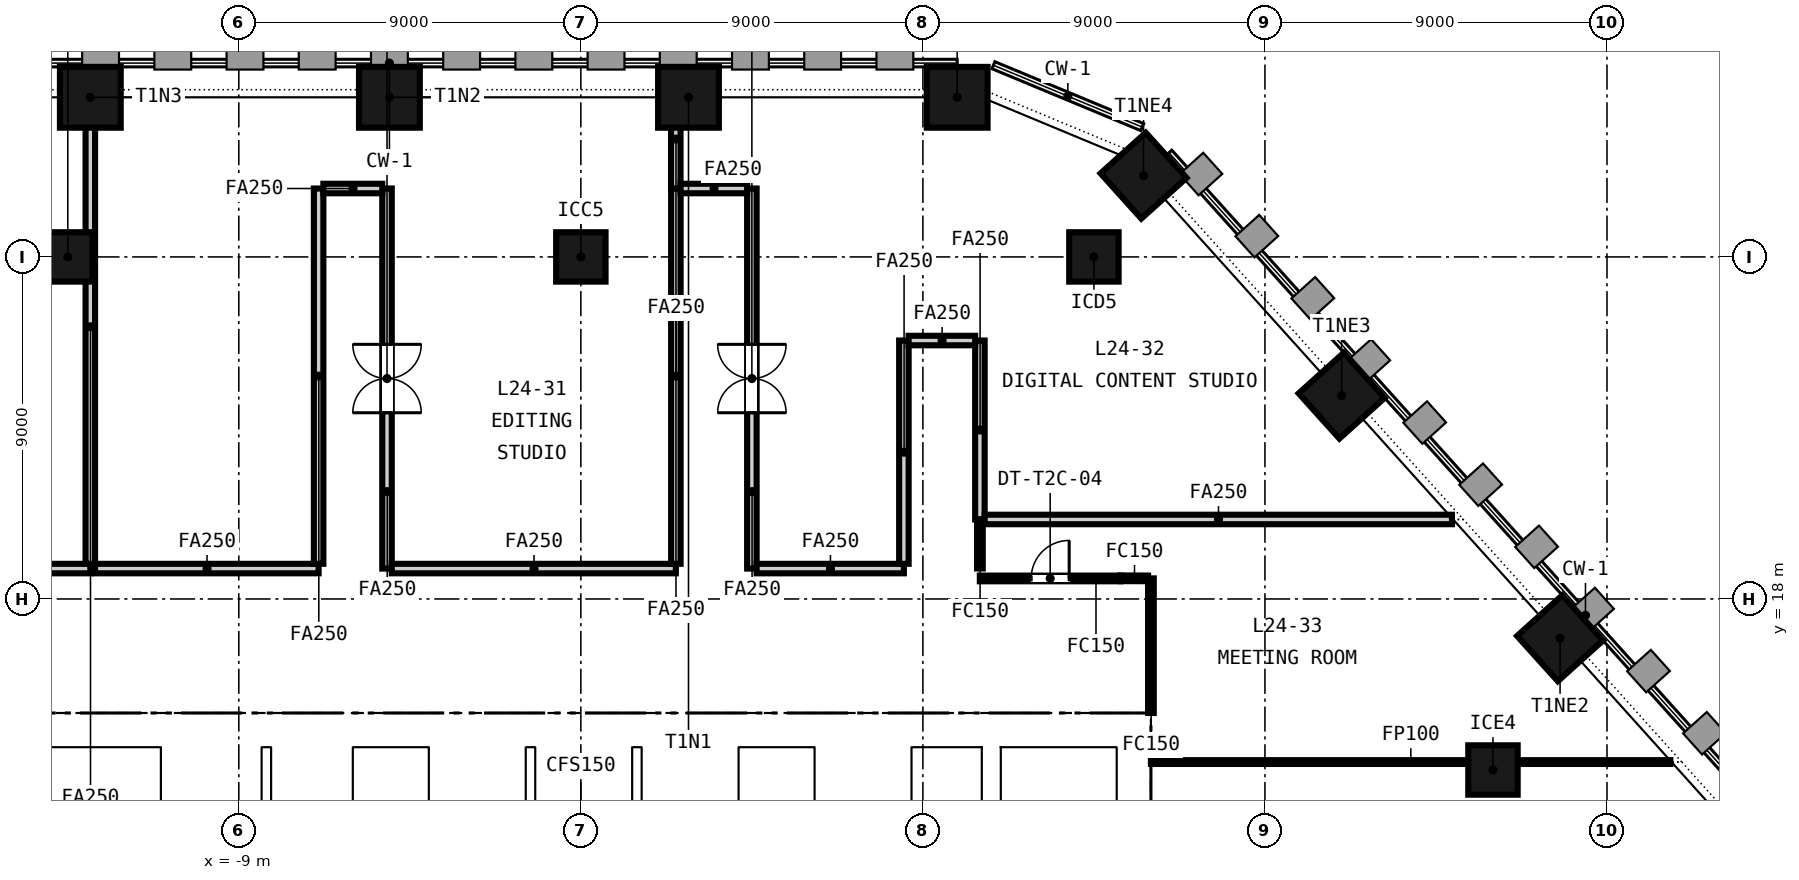
"""IFC4 building model, lengths in metres.
Left out: names, types, materials, properties, quantities, classifications, styles, units other than length and angle.
Written with IfcOpenShell. Run it as: python <this file> out.ifc"""

import sys

from ifc_helpers import new_model, si_unit, direction, frame, frame_2d, origin, origin_2d, place, context, subcontext, project, spatial, rectangle, extrude, element, fill, save


model = new_model("IFC4")
c1 = context("Model", 3, precision=1e-05, world=origin(), true_north=direction((0.0, 1.0)))
c2 = subcontext(c1, "Body", "Model", "MODEL_VIEW")
j1 = project(units=[si_unit("LENGTHUNIT", "METRE"), si_unit("PLANEANGLEUNIT", "RADIAN")], contexts=[c1])
p1 = place(None, origin())
s1 = spatial("IfcSite", under=j1, at=p1, CompositionType="ELEMENT")
p2 = place(p1, origin())
s2 = spatial("IfcBuilding", under=s1, at=p2, CompositionType="ELEMENT")
p3 = place(p2, frame((0.0, 0.0, 102.55)))
s3 = spatial("IfcBuildingStorey", under=s2, at=p3, CompositionType="ELEMENT", Elevation=102.55)
p4 = place(p3, frame((-15.0, 14.55, -0.15), z_axis=(0.0, 0.0, 1.0), x_axis=(1.0, 0.0, 0.0)))
e1 = element("IfcWall", 1, at=p4, inside=s3, PredefinedType="SOLIDWALL", context=c2, shape_type="SweptSolid", body=[
    extrude(rectangle(XDim=30.0, YDim=0.9, at=frame_2d((15.0, 0.0))), origin(), (0.0, 0.0, 1.0), 3.65),
])
p5 = place(p4, frame((9.25, 0.0, 0.15)))
e2 = element("IfcOpeningElement", 2, at=p5, cuts=e1, PredefinedType="OPENING", context=c2, shape_type="SweptSolid", body=[
    extrude(rectangle(XDim=1.5, YDim=2.1, at=frame_2d((0.75, 1.05))), frame((0.0, 0.46, 0.0), z_axis=(0.0, -1.0, 0.0), x_axis=(1.0, 0.0, 0.0)), (0.0, 0.0, 1.0), 0.92),
])
p6 = place(p4, frame((19.4, 0.0, 0.15)))
e3 = element("IfcOpeningElement", 3, at=p6, cuts=e1, PredefinedType="OPENING", context=c2, shape_type="SweptSolid", body=[
    extrude(rectangle(XDim=1.5, YDim=2.1, at=frame_2d((0.75, 1.05))), frame((0.0, 0.46, 0.0), z_axis=(0.0, -1.0, 0.0), x_axis=(1.0, 0.0, 0.0)), (0.0, 0.0, 1.0), 0.92),
])
p7 = place(p4, frame((1.5, 0.0, 0.15)))
e4 = element("IfcOpeningElement", 4, at=p7, cuts=e1, PredefinedType="OPENING", context=c2, shape_type="SweptSolid", body=[
    extrude(rectangle(XDim=1.2, YDim=2.1, at=frame_2d((0.6, 1.05))), frame((0.0, 0.46, 0.0), z_axis=(0.0, -1.0, 0.0), x_axis=(1.0, 0.0, 0.0)), (0.0, 0.0, 1.0), 0.92),
])
p8 = place(p4, frame((27.3, 0.0, 0.15)))
e5 = element("IfcOpeningElement", 5, at=p8, cuts=e1, PredefinedType="OPENING", context=c2, shape_type="SweptSolid", body=[
    extrude(rectangle(XDim=1.2, YDim=2.1, at=frame_2d((0.6, 1.05))), frame((0.0, 0.46, 0.0), z_axis=(0.0, -1.0, 0.0), x_axis=(1.0, 0.0, 0.0)), (0.0, 0.0, 1.0), 0.92),
])
p9 = place(p3, frame((14.55, 0.9, -0.15), z_axis=(0.0, 0.0, 1.0), x_axis=(0.0, 1.0, 0.0)))
e6 = element("IfcWall", 6, at=p9, inside=s3, PredefinedType="SOLIDWALL", context=c2, shape_type="SweptSolid", body=[
    extrude(rectangle(XDim=13.2, YDim=0.9, at=frame_2d((6.6, 0.0))), origin(), (0.0, 0.0, 1.0), 3.65),
])
for number, where, z_axis, x_axis in (
    (7, (-10.8, 0.9, -0.15), (0.0, 0.0, 1.0), (0.0, 1.0, 0.0)),
    (8, (10.8, 0.9, -0.15), (0.0, 0.0, 1.0), (0.0, 1.0, 0.0)),
):
    element("IfcWall", number, at=place(p3, frame(where, z_axis=z_axis, x_axis=x_axis)), inside=s3, PredefinedType="SOLIDWALL", context=c2, shape_type="SweptSolid", body=[
        extrude(rectangle(XDim=13.2, YDim=0.5, at=frame_2d((6.6, 0.0))), origin(), (0.0, 0.0, 1.0), 3.65),
    ])
for number, where, z_axis, x_axis in (
    (9, (9.902, 31.2, -0.15), (0.0, 0.0, 1.0), (-1.0, 0.0, 0.0)),
    (10, (2.832, 31.2, -0.15), (0.0, 0.0, 1.0), (-1.0, 0.0, 0.0)),
    (11, (-5.037, 31.2, -0.15), (0.0, 0.0, 1.0), (-1.0, 0.0, 0.0)),
    (12, (-12.907, 31.2, -0.15), (0.0, 0.0, 1.0), (-1.0, 0.0, 0.0)),
    (13, (25.765, 16.967, -0.15), (0.0, 0.0, 1.0), (-0.669, 0.743, 0.0)),
    (14, (20.018, 23.35, -0.15), (0.0, 0.0, 1.0), (-0.669, 0.743, 0.0)),
    (15, (14.806, 29.139, -0.15), (0.0, 0.0, 1.0), (-0.669, 0.743, 0.0)),
):
    element("IfcColumn", number, at=place(p3, frame(where, z_axis=z_axis, x_axis=x_axis)), inside=s3, PredefinedType="COLUMN", context=c2, shape_type="SweptSolid", body=[
        extrude(rectangle(XDim=1.6, YDim=1.6, at=origin_2d()), origin(), (0.0, 0.0, 1.0), 3.65),
    ])
for number, where, z_axis, x_axis in (
    (16, (-13.5, 27.0, -0.15), (0.0, 0.0, 1.0), (1.0, 0.0, 0.0)),
    (17, (0.0, 27.0, -0.15), (0.0, 0.0, 1.0), (1.0, 0.0, 0.0)),
    (18, (13.5, 27.0, -0.15), (0.0, 0.0, 1.0), (1.0, 0.0, 0.0)),
    (19, (24.0, 13.5, -0.15), (0.0, 0.0, 1.0), (1.0, 0.0, 0.0)),
):
    element("IfcColumn", number, at=place(p3, frame(where, z_axis=z_axis, x_axis=x_axis)), inside=s3, PredefinedType="COLUMN", context=c2, shape_type="SweptSolid", body=[
        extrude(rectangle(XDim=1.3, YDim=1.3, at=origin_2d()), origin(), (0.0, 0.0, 1.0), 3.65),
    ])
for number, where, z_axis, x_axis in (
    (20, (-8.275, 11.3, 0.0), (0.0, 0.0, 1.0), (0.0, 1.0, 0.0)),
    (21, (-5.875, 11.3, 0.0), (0.0, 0.0, 1.0), (0.0, 1.0, 0.0)),
    (22, (-4.125, 11.3, 0.0), (0.0, 0.0, 1.0), (0.0, 1.0, 0.0)),
    (23, (-1.325, 11.3, 0.0), (0.0, 0.0, 1.0), (0.0, 1.0, 0.0)),
    (24, (1.475, 11.3, 0.0), (0.0, 0.0, 1.0), (0.0, 1.0, 0.0)),
    (25, (4.275, 11.3, 0.0), (0.0, 0.0, 1.0), (0.0, 1.0, 0.0)),
    (26, (6.025, 11.3, 0.0), (0.0, 0.0, 1.0), (0.0, 1.0, 0.0)),
    (27, (8.825, 11.3, 0.0), (0.0, 0.0, 1.0), (0.0, 1.0, 0.0)),
):
    element("IfcWall", number, at=place(p3, frame(where, z_axis=z_axis, x_axis=x_axis)), inside=s3, PredefinedType="PARTITIONING", context=c2, shape_type="SweptSolid", body=[
        extrude(rectangle(XDim=2.8, YDim=0.25, at=frame_2d((1.4, 0.0))), origin(), (0.0, 0.0, 1.0), 3.5),
    ])
p10 = place(p3, frame((14.05, 0.9, 0.0), z_axis=(0.0, 0.0, 1.0), x_axis=(0.0, 1.0, 0.0)))
e28 = element("IfcWall", 28, at=p10, inside=s3, PredefinedType="SOLIDWALL", context=c2, shape_type="SweptSolid", body=[
    extrude(rectangle(XDim=13.2, YDim=0.1, at=frame_2d((6.6, 0.0))), origin(), (0.0, 0.0, 1.0), 3.5),
])
p11 = place(p3, frame((-5.1, 28.8, 0.0), z_axis=(0.0, 0.0, 1.0), x_axis=(0.0, -1.0, 0.0)))
e29 = element("IfcWall", 29, at=p11, inside=s3, PredefinedType="PARTITIONING", context=c2, shape_type="SweptSolid", body=[
    extrude(rectangle(XDim=10.0, YDim=0.25, at=frame_2d((5.0, 0.0))), origin(), (0.0, 0.0, 1.0), 2.741),
])
p12 = place(p11, frame((4.1, 0.0, 0.0)))
e30 = element("IfcOpeningElement", 30, at=p12, cuts=e29, PredefinedType="OPENING", context=c2, shape_type="SweptSolid", body=[
    extrude(rectangle(XDim=1.8, YDim=2.1, at=frame_2d((0.9, 1.05))), frame((0.0, 0.135, 0.0), z_axis=(0.0, -1.0, 0.0), x_axis=(1.0, 0.0, 0.0)), (0.0, 0.0, 1.0), 0.27),
])
p13 = place(p3, frame((4.5, 28.8, 0.0), z_axis=(0.0, 0.0, 1.0), x_axis=(0.0, -1.0, 0.0)))
e31 = element("IfcWall", 31, at=p13, inside=s3, PredefinedType="PARTITIONING", context=c2, shape_type="SweptSolid", body=[
    extrude(rectangle(XDim=10.0, YDim=0.25, at=frame_2d((5.0, 0.0))), origin(), (0.0, 0.0, 1.0), 2.741),
])
p14 = place(p13, frame((4.1, 0.0, 0.0)))
e32 = element("IfcOpeningElement", 32, at=p14, cuts=e31, PredefinedType="OPENING", context=c2, shape_type="SweptSolid", body=[
    extrude(rectangle(XDim=1.8, YDim=2.1, at=frame_2d((0.9, 1.05))), frame((0.0, 0.135, 0.0), z_axis=(0.0, -1.0, 0.0), x_axis=(1.0, 0.0, 0.0)), (0.0, 0.0, 1.0), 0.27),
])
p15 = place(p3, frame((10.5, 24.8, 0.0), z_axis=(0.0, 0.0, 1.0), x_axis=(0.0, -1.0, 0.0)))
e33 = element("IfcWall", 33, at=p15, inside=s3, PredefinedType="PARTITIONING", context=c2, shape_type="SweptSolid", body=[
    extrude(rectangle(XDim=4.708, YDim=0.25, at=frame_2d((2.354, 0.0))), origin(), (0.0, 0.0, 1.0), 2.741),
])
p16 = place(p3, frame((10.5, 20.092, 0.0), z_axis=(0.0, 0.0, 1.0), x_axis=(0.0, -1.0, 0.0)))
e34 = element("IfcWall", 34, at=p16, inside=s3, PredefinedType="PARTITIONING", context=c2, shape_type="SweptSolid", body=[
    extrude(rectangle(XDim=1.29, YDim=0.15, at=frame_2d((0.645, 0.0))), origin(), (0.0, 0.0, 1.0), 2.741),
])
p17 = place(p3, frame((15.0, 18.542, 0.0), z_axis=(0.0, 0.0, 1.0), x_axis=(0.0, -1.0, 0.0)))
e35 = element("IfcWall", 35, at=p17, inside=s3, PredefinedType="PARTITIONING", context=c2, shape_type="SweptSolid", body=[
    extrude(rectangle(XDim=3.542, YDim=0.15, at=frame_2d((1.771, 0.0))), origin(), (0.0, 0.0, 1.0), 2.741),
])
p18 = place(p3, frame((-17.875, 18.8, 0.0), z_axis=(0.0, 0.0, 1.0), x_axis=(1.0, 0.0, 0.0)))
e36 = element("IfcWall", 36, at=p18, inside=s3, PredefinedType="PARTITIONING", context=c2, shape_type="SweptSolid", body=[
    extrude(rectangle(XDim=4.968, YDim=0.25, at=frame_2d((2.484, 0.0))), origin(), (0.0, 0.0, 1.0), 2.741),
])
p19 = place(p3, frame((-12.907, 18.925, 0.0), z_axis=(0.0, 0.0, 1.0), x_axis=(0.0, 1.0, 0.0)))
e37 = element("IfcWall", 37, at=p19, inside=s3, PredefinedType="PARTITIONING", context=c2, shape_type="SweptSolid", body=[
    extrude(rectangle(XDim=12.475, YDim=0.25, at=frame_2d((6.237, 0.0))), origin(), (0.0, 0.0, 1.0), 2.741),
])
p20 = place(p3, frame((-12.782, 18.8, 0.0), z_axis=(0.0, 0.0, 1.0), x_axis=(1.0, 0.0, 0.0)))
e38 = element("IfcWall", 38, at=p20, inside=s3, PredefinedType="PARTITIONING", context=c2, shape_type="SweptSolid", body=[
    extrude(rectangle(XDim=5.882, YDim=0.25, at=frame_2d((2.941, 0.0))), origin(), (0.0, 0.0, 1.0), 2.741),
])
p21 = place(p3, frame((-6.9, 18.925, 0.0), z_axis=(0.0, 0.0, 1.0), x_axis=(0.0, 1.0, 0.0)))
e39 = element("IfcWall", 39, at=p21, inside=s3, PredefinedType="PARTITIONING", context=c2, shape_type="SweptSolid", body=[
    extrude(rectangle(XDim=9.875, YDim=0.25, at=frame_2d((4.938, 0.0))), origin(), (0.0, 0.0, 1.0), 2.741),
])
p22 = place(p3, frame((-6.775, 28.8, 0.0), z_axis=(0.0, 0.0, 1.0), x_axis=(1.0, 0.0, 0.0)))
e40 = element("IfcWall", 40, at=p22, inside=s3, PredefinedType="PARTITIONING", context=c2, shape_type="SweptSolid", body=[
    extrude(rectangle(XDim=1.55, YDim=0.25, at=frame_2d((0.775, 0.0))), origin(), (0.0, 0.0, 1.0), 2.741),
])
p23 = place(p3, frame((-4.975, 18.8, 0.0), z_axis=(0.0, 0.0, 1.0), x_axis=(1.0, 0.0, 0.0)))
e41 = element("IfcWall", 41, at=p23, inside=s3, PredefinedType="PARTITIONING", context=c2, shape_type="SweptSolid", body=[
    extrude(rectangle(XDim=7.475, YDim=0.25, at=frame_2d((3.738, 0.0))), origin(), (0.0, 0.0, 1.0), 2.741),
])
p24 = place(p3, frame((2.5, 18.925, 0.0), z_axis=(0.0, 0.0, 1.0), x_axis=(0.0, 1.0, 0.0)))
e42 = element("IfcWall", 42, at=p24, inside=s3, PredefinedType="PARTITIONING", context=c2, shape_type="SweptSolid", body=[
    extrude(rectangle(XDim=9.875, YDim=0.25, at=frame_2d((4.938, 0.0))), origin(), (0.0, 0.0, 1.0), 2.741),
])
p25 = place(p3, frame((2.498, 28.8, 0.0), z_axis=(0.0, 0.0, 1.0), x_axis=(0.0, 1.0, 0.0)))
e43 = element("IfcWall", 43, at=p25, inside=s3, PredefinedType="PARTITIONING", context=c2, shape_type="SweptSolid", body=[
    extrude(rectangle(XDim=2.6, YDim=0.25, at=frame_2d((1.3, 0.0))), origin(), (0.0, 0.0, 1.0), 2.741),
])
p26 = place(p3, frame((2.625, 28.8, 0.0), z_axis=(0.0, 0.0, 1.0), x_axis=(1.0, 0.0, 0.0)))
e44 = element("IfcWall", 44, at=p26, inside=s3, PredefinedType="PARTITIONING", context=c2, shape_type="SweptSolid", body=[
    extrude(rectangle(XDim=1.75, YDim=0.25, at=frame_2d((0.875, 0.0))), origin(), (0.0, 0.0, 1.0), 2.741),
])
p27 = place(p3, frame((4.625, 18.8, 0.0), z_axis=(0.0, 0.0, 1.0), x_axis=(1.0, 0.0, 0.0)))
e45 = element("IfcWall", 45, at=p27, inside=s3, PredefinedType="PARTITIONING", context=c2, shape_type="SweptSolid", body=[
    extrude(rectangle(XDim=3.875, YDim=0.25, at=frame_2d((1.938, 0.0))), origin(), (0.0, 0.0, 1.0), 2.741),
])
p28 = place(p3, frame((8.5, 18.925, 0.0), z_axis=(0.0, 0.0, 1.0), x_axis=(0.0, 1.0, 0.0)))
e46 = element("IfcWall", 46, at=p28, inside=s3, PredefinedType="PARTITIONING", context=c2, shape_type="SweptSolid", body=[
    extrude(rectangle(XDim=5.875, YDim=0.25, at=frame_2d((2.938, 0.0))), origin(), (0.0, 0.0, 1.0), 2.741),
])
p29 = place(p3, frame((8.625, 24.8, 0.0), z_axis=(0.0, 0.0, 1.0), x_axis=(1.0, 0.0, 0.0)))
e47 = element("IfcWall", 47, at=p29, inside=s3, PredefinedType="PARTITIONING", context=c2, shape_type="SweptSolid", body=[
    extrude(rectangle(XDim=1.75, YDim=0.25, at=frame_2d((0.875, 0.0))), origin(), (0.0, 0.0, 1.0), 2.741),
])
p30 = place(p3, frame((10.625, 20.092, 0.0), z_axis=(0.0, 0.0, 1.0), x_axis=(1.0, 0.0, 0.0)))
e48 = element("IfcWall", 48, at=p30, inside=s3, PredefinedType="PARTITIONING", context=c2, shape_type="SweptSolid", body=[
    extrude(rectangle(XDim=12.296, YDim=0.25, at=frame_2d((6.148, 0.0))), origin(), (0.0, 0.0, 1.0), 2.741),
])
p31 = place(p3, frame((10.498, 18.54, 0.0), z_axis=(0.0, 0.0, 1.0), x_axis=(1.0, 0.0, 0.0)))
e49 = element("IfcWall", 49, at=p31, inside=s3, PredefinedType="PARTITIONING", context=c2, shape_type="SweptSolid", body=[
    extrude(rectangle(XDim=3.702, YDim=0.15, at=frame_2d((1.851, 0.0))), origin(), (0.0, 0.0, 1.0), 2.741),
])
p32 = place(p31, frame((1.351, 0.0, 0.0)))
e50 = element("IfcOpeningElement", 50, at=p32, cuts=e49, PredefinedType="OPENING", context=c2, shape_type="SweptSolid", body=[
    extrude(rectangle(XDim=1.0, YDim=2.1, at=frame_2d((0.5, 1.05))), frame((0.0, 0.085, 0.0), z_axis=(0.0, -1.0, 0.0), x_axis=(1.0, 0.0, 0.0)), (0.0, 0.0, 1.0), 0.17),
])
p33 = place(p3, frame((14.2, 18.544, 0.0), z_axis=(0.0, 0.0, 1.0), x_axis=(0.999997222517, -0.002356895811, 0.0)))
e51 = element("IfcWall", 51, at=p33, inside=s3, PredefinedType="PARTITIONING", context=c2, shape_type="SweptSolid", body=[
    extrude(rectangle(XDim=0.725, YDim=0.15, at=frame_2d((0.363, 0.0))), origin(), (0.0, 0.0, 1.0), 2.741),
])
p34 = place(p3, frame((15.0, 13.709, 0.0), z_axis=(0.0, 0.0, 1.0), x_axis=(1.0, 0.0, 0.0)))
e52 = element("IfcWall", 52, at=p34, inside=s3, PredefinedType="PARTITIONING", context=c2, shape_type="SweptSolid", body=[
    extrude(rectangle(XDim=13.668, YDim=0.1, at=frame_2d((6.834, 0.0))), origin(), (0.0, 0.0, 1.0), 2.741),
])
p35 = place(p5, origin())
e53 = element("IfcDoor", 53, at=p35, inside=s3, OperationType="DOUBLE_DOOR_SINGLE_SWING", PredefinedType="DOOR", context=c2, shape_type="SweptSolid", body=[
    extrude(rectangle(XDim=1.5, YDim=2.1, at=frame_2d((0.75, 1.05))), frame((0.0, 0.025, 0.0), z_axis=(0.0, -1.0, 0.0), x_axis=(1.0, 0.0, 0.0)), (0.0, 0.0, 1.0), 0.05),
])
fill(e2, e53)
p36 = place(p6, origin())
e54 = element("IfcDoor", 54, at=p36, inside=s3, OperationType="DOUBLE_DOOR_SINGLE_SWING", PredefinedType="DOOR", context=c2, shape_type="SweptSolid", body=[
    extrude(rectangle(XDim=1.5, YDim=2.1, at=frame_2d((0.75, 1.05))), frame((0.0, 0.025, 0.0), z_axis=(0.0, -1.0, 0.0), x_axis=(1.0, 0.0, 0.0)), (0.0, 0.0, 1.0), 0.05),
])
fill(e3, e54)
p37 = place(p7, origin())
e55 = element("IfcDoor", 55, at=p37, inside=s3, OperationType="SINGLE_SWING_RIGHT", PredefinedType="DOOR", context=c2, shape_type="SweptSolid", body=[
    extrude(rectangle(XDim=1.2, YDim=2.1, at=frame_2d((0.6, 1.05))), frame((0.0, 0.025, 0.0), z_axis=(0.0, -1.0, 0.0), x_axis=(1.0, 0.0, 0.0)), (0.0, 0.0, 1.0), 0.05),
])
fill(e4, e55)
p38 = place(p8, origin())
e56 = element("IfcDoor", 56, at=p38, inside=s3, OperationType="SINGLE_SWING_LEFT", PredefinedType="DOOR", context=c2, shape_type="SweptSolid", body=[
    extrude(rectangle(XDim=1.2, YDim=2.1, at=frame_2d((0.6, 1.05))), frame((0.0, 0.025, 0.0), z_axis=(0.0, -1.0, 0.0), x_axis=(1.0, 0.0, 0.0)), (0.0, 0.0, 1.0), 0.05),
])
fill(e5, e56)
p39 = place(p12, origin())
e57 = element("IfcDoor", 57, at=p39, inside=s3, OperationType="DOUBLE_DOOR_DOUBLE_SWING", PredefinedType="DOOR", context=c2, shape_type="SweptSolid", body=[
    extrude(rectangle(XDim=1.8, YDim=2.1, at=frame_2d((0.9, 1.05))), frame((0.0, 0.025, 0.0), z_axis=(0.0, -1.0, 0.0), x_axis=(1.0, 0.0, 0.0)), (0.0, 0.0, 1.0), 0.05),
])
fill(e30, e57)
p40 = place(p14, origin())
e58 = element("IfcDoor", 58, at=p40, inside=s3, OperationType="DOUBLE_DOOR_DOUBLE_SWING", PredefinedType="DOOR", context=c2, shape_type="SweptSolid", body=[
    extrude(rectangle(XDim=1.8, YDim=2.1, at=frame_2d((0.9, 1.05))), frame((0.0, 0.025, 0.0), z_axis=(0.0, -1.0, 0.0), x_axis=(1.0, 0.0, 0.0)), (0.0, 0.0, 1.0), 0.05),
])
fill(e32, e58)
p41 = place(p32, origin())
e59 = element("IfcDoor", 59, at=p41, inside=s3, OperationType="SINGLE_SWING_RIGHT", PredefinedType="DOOR", context=c2, shape_type="SweptSolid", body=[
    extrude(rectangle(XDim=1.0, YDim=2.1, at=frame_2d((0.5, 1.05))), frame((0.0, 0.025, 0.0), z_axis=(0.0, -1.0, 0.0), x_axis=(1.0, 0.0, 0.0)), (0.0, 0.0, 1.0), 0.05),
])
fill(e50, e59)
save(model, sys.argv[1])
